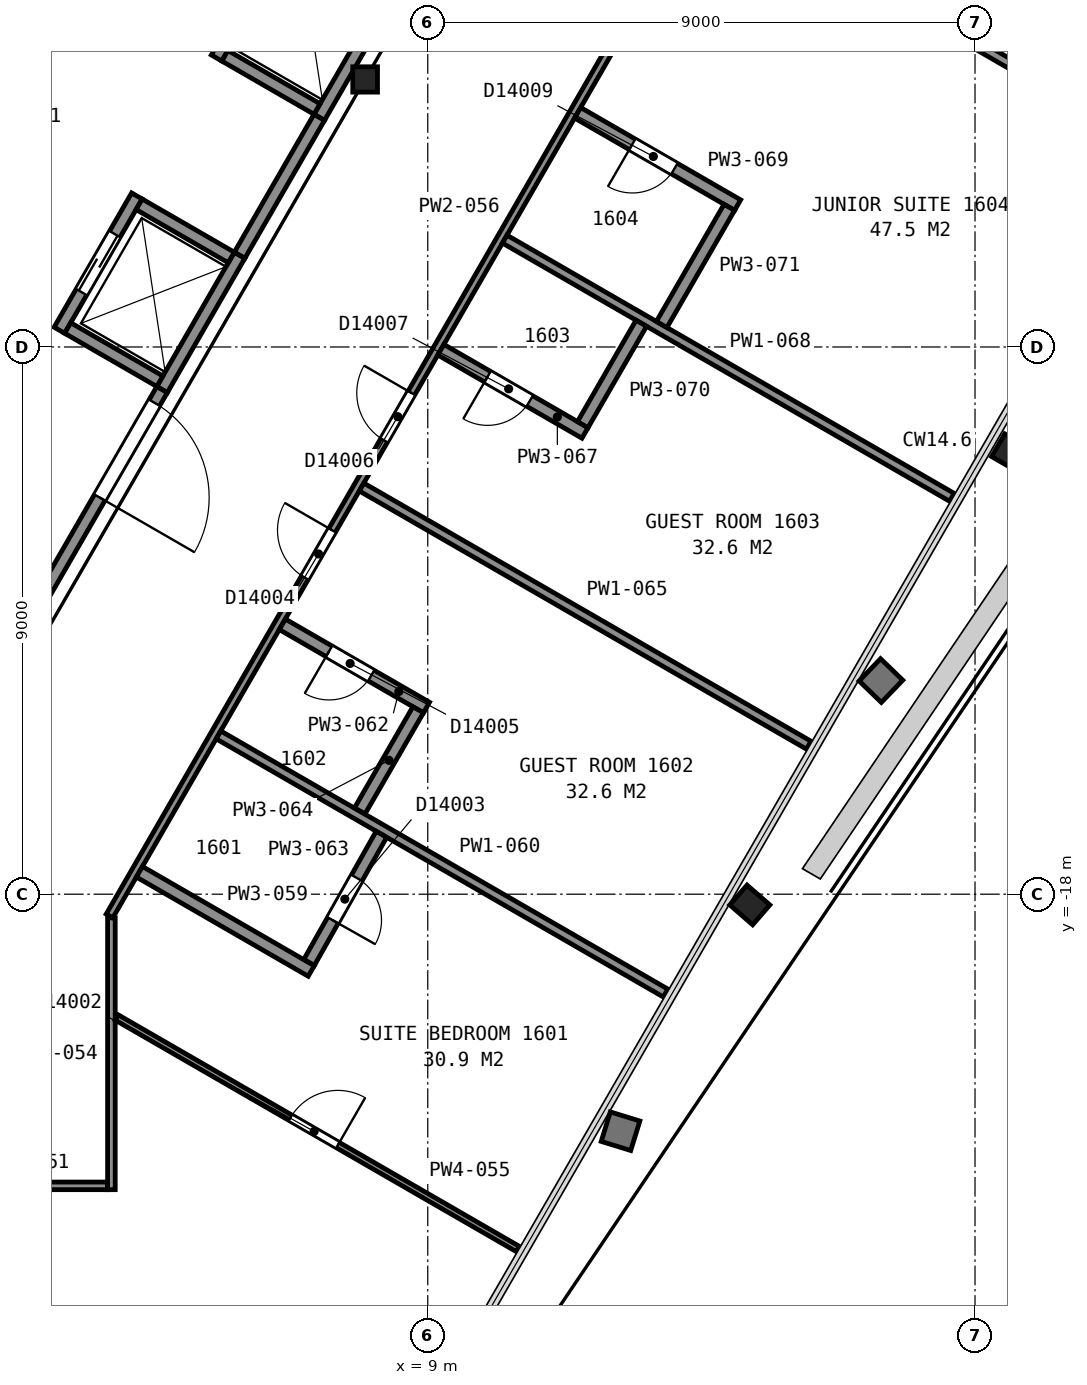
"""IFC4 building model, lengths in metres.
Left out: names, types, materials, properties, quantities, classifications, styles, units other than length and angle.
Written with IfcOpenShell. Run it as: python <this file> out.ifc"""

import sys

from ifc_helpers import new_model, si_unit, direction, frame, frame_2d, origin, origin_2d, place, context, subcontext, project, spatial, rectangle, i_section, extrude, element, fill, save


model = new_model("IFC4")
c1 = context("Model", 3, precision=1e-05, world=origin(), true_north=direction((0.0, 1.0)))
c2 = subcontext(c1, "Body", "Model", "MODEL_VIEW")
j1 = project(units=[si_unit("LENGTHUNIT", "METRE"), si_unit("PLANEANGLEUNIT", "RADIAN")], contexts=[c1])
p1 = place(None, origin())
s1 = spatial("IfcSite", under=j1, at=p1, CompositionType="ELEMENT")
p2 = place(p1, origin())
s2 = spatial("IfcBuilding", under=s1, at=p2, CompositionType="ELEMENT")
p3 = place(p2, frame((0.0, 0.0, 72.8)))
s3 = spatial("IfcBuildingStorey", under=s2, at=p3, CompositionType="ELEMENT", Elevation=72.8)
p4 = place(p3, frame((14.222, -18.111, 0.025), z_axis=(0.063660519168, -0.055368890729, 0.996434455566), x_axis=(-0.500027144747, -0.865858806591, -0.01616729924)))
e1 = element("IfcColumn", 1, at=p4, inside=s3, PredefinedType="COLUMN", context=c2, shape_type="SweptSolid", body=[
    extrude(i_section(OverallWidth=0.432, OverallDepth=0.498, WebThickness=0.056, FlangeThickness=0.089, FilletRadius=0.015, at=origin_2d()), origin(), (0.0, 0.0, 1.0), 3.563),
])
p5 = place(p3, frame((18.512, -10.691, 0.025), z_axis=(0.07202792121, -0.041599379805, 0.996534731038), x_axis=(-0.500403695, -0.865792204467, 2.6711735e-05)))
e2 = element("IfcColumn", 2, at=p5, inside=s3, PredefinedType="COLUMN", context=c2, shape_type="SweptSolid", body=[
    extrude(i_section(OverallWidth=0.432, OverallDepth=0.498, WebThickness=0.056, FlangeThickness=0.089, FilletRadius=0.015, at=origin_2d()), origin(), (0.0, 0.0, 1.0), 3.562),
])
p6 = place(p3, frame((7.97, -4.6, 0.0), z_axis=(0.0, 0.0, 1.0), x_axis=(1.0, 0.0, 0.0)))
e3 = element("IfcColumn", 3, at=p6, inside=s3, PredefinedType="COLUMN", context=c2, shape_type="SweptSolid", body=[
    extrude(i_section(OverallWidth=0.406, OverallDepth=0.417, WebThickness=0.03, FlangeThickness=0.048, FilletRadius=0.015, at=origin_2d()), origin(), (0.0, 0.0, 1.0), 3.6),
])
p7 = place(p3, frame((4.63, -9.7, 0.0), z_axis=(0.0, 0.0, 1.0), x_axis=(0.500062241894, 0.865989465428, 0.0)))
e4 = element("IfcWall", 4, at=p7, inside=s3, PredefinedType="PARTITIONING", context=c2, shape_type="SweptSolid", body=[
    extrude(rectangle(XDim=2.55, YDim=0.2, at=frame_2d((1.275, 0.0))), origin(), (0.0, 0.0, 1.0), 3.6),
])
p8 = place(p3, frame((7.216, -5.222, 0.0), z_axis=(0.0, 0.0, 1.0), x_axis=(0.499990435942, 0.866030925526, 0.0)))
e5 = element("IfcWall", 5, at=p8, inside=s3, PredefinedType="PARTITIONING", context=c2, shape_type="SweptSolid", body=[
    extrude(rectangle(XDim=2.55, YDim=0.2, at=frame_2d((1.275, 0.0))), origin(), (0.0, 0.0, 1.0), 3.6),
])
p9 = place(p3, frame((2.942, -8.725, 0.0), z_axis=(0.0, 0.0, 1.0), x_axis=(0.500020783669, 0.866013403995, 0.0)))
e6 = element("IfcWall", 6, at=p9, inside=s3, PredefinedType="PARTITIONING", context=c2, shape_type="SweptSolid", body=[
    extrude(rectangle(XDim=2.55, YDim=0.2, at=frame_2d((1.275, 0.0))), origin(), (0.0, 0.0, 1.0), 3.6),
])
p10 = place(p9, frame((0.725, 0.0, 0.0)))
e7 = element("IfcOpeningElement", 7, at=p10, cuts=e6, PredefinedType="OPENING", context=c2, shape_type="SweptSolid", body=[
    extrude(rectangle(XDim=1.1, YDim=2.1, at=frame_2d((0.55, 1.05))), frame((0.0, 0.11, 0.0), z_axis=(0.0, -1.0, 0.0), x_axis=(1.0, 0.0, 0.0)), (0.0, 0.0, 1.0), 0.22),
])
p11 = place(p3, frame((5.527, -4.247, 0.0), z_axis=(0.0, 0.0, 1.0), x_axis=(0.499938297808, 0.866061024631, 0.0)))
e8 = element("IfcWall", 8, at=p11, inside=s3, PredefinedType="PARTITIONING", context=c2, shape_type="SweptSolid", body=[
    extrude(rectangle(XDim=2.35, YDim=0.2, at=frame_2d((1.175, 0.0))), origin(), (0.0, 0.0, 1.0), 3.6),
])
p12 = place(p11, frame((0.725, 0.0, 0.0)))
e9 = element("IfcOpeningElement", 9, at=p12, cuts=e8, PredefinedType="OPENING", context=c2, shape_type="SweptSolid", body=[
    extrude(rectangle(XDim=1.1, YDim=2.1, at=frame_2d((0.55, 1.05))), frame((0.0, 0.11, 0.0), z_axis=(0.0, -1.0, 0.0), x_axis=(1.0, 0.0, 0.0)), (0.0, 0.0, 1.0), 0.22),
])
p13 = place(p3, frame((7.179, -5.086, 0.0), z_axis=(0.0, 0.0, 1.0), x_axis=(-0.866036909293, 0.499980071345, 0.0)))
e10 = element("IfcWall", 10, at=p13, inside=s3, PredefinedType="PARTITIONING", context=c2, shape_type="SweptSolid", body=[
    extrude(rectangle(XDim=1.75, YDim=0.2, at=frame_2d((0.875, 0.0))), origin(), (0.0, 0.0, 1.0), 3.6),
])
p14 = place(p3, frame((5.769, -7.528, 0.0), z_axis=(0.0, 0.0, 1.0), x_axis=(-0.866002029911, 0.500040482552, 0.0)))
e11 = element("IfcWall", 11, at=p14, inside=s3, PredefinedType="PARTITIONING", context=c2, shape_type="SweptSolid", body=[
    extrude(rectangle(XDim=1.75, YDim=0.2, at=frame_2d((0.875, 0.0))), origin(), (0.0, 0.0, 1.0), 3.6),
])
p15 = place(p3, frame((4.594, -9.563, 0.0), z_axis=(0.0, 0.0, 1.0), x_axis=(-0.866036909293, 0.499980071345, 0.0)))
e12 = element("IfcWall", 12, at=p15, inside=s3, PredefinedType="PARTITIONING", context=c2, shape_type="SweptSolid", body=[
    extrude(rectangle(XDim=1.75, YDim=0.2, at=frame_2d((0.875, 0.0))), origin(), (0.0, 0.0, 1.0), 3.6),
])
p16 = place(p3, frame((1.677, -14.815, 0.0), z_axis=(0.0, 0.0, 1.0), x_axis=(0.49999445743, 0.866028603765, 0.0)))
e13 = element("IfcWall", 13, at=p16, inside=s3, PredefinedType="PARTITIONING", context=c2, shape_type="SweptSolid", body=[
    extrude(rectangle(XDim=5.905, YDim=0.2, at=frame_2d((2.952, 0.0))), origin(), (0.0, 0.0, 1.0), 3.35),
])
p17 = place(p16, frame((3.855, 0.0, 0.0)))
e14 = element("IfcOpeningElement", 14, at=p17, cuts=e13, PredefinedType="OPENING", context=c2, shape_type="SweptSolid", body=[
    extrude(rectangle(XDim=1.8, YDim=2.1, at=frame_2d((0.9, 1.05))), frame((0.0, 0.11, 0.0), z_axis=(0.0, -1.0, 0.0), x_axis=(1.0, 0.0, 0.0)), (0.0, 0.0, 1.0), 0.22),
])
p18 = place(p3, frame((5.906, -7.49, 0.0), z_axis=(0.0, 0.0, 1.0), x_axis=(0.500252727967, 0.865879442048, 0.0)))
e15 = element("IfcWall", 15, at=p18, inside=s3, PredefinedType="PARTITIONING", context=c2, shape_type="SweptSolid", body=[
    extrude(rectangle(XDim=2.617, YDim=0.2, at=frame_2d((1.309, 0.0))), origin(), (0.0, 0.0, 1.0), 3.35),
])
p19 = place(p3, frame((1.14, -22.797, 0.0), z_axis=(0.0, 0.0, 1.0), x_axis=(1.0, 0.0, 0.0)))
e16 = element("IfcWall", 16, at=p19, inside=s3, PredefinedType="PARTITIONING", context=c2, shape_type="SweptSolid", body=[
    extrude(rectangle(XDim=2.592, YDim=0.125, at=frame_2d((1.296, 0.0))), origin(), (0.0, 0.0, 1.0), 2.613),
])
p20 = place(p3, frame((3.797, -22.86, 0.0), z_axis=(0.0, 0.0, 1.0), x_axis=(0.0, 1.0, 0.0)))
e17 = element("IfcWall", 17, at=p20, inside=s3, PredefinedType="PARTITIONING", context=c2, shape_type="SweptSolid", body=[
    extrude(rectangle(XDim=4.471, YDim=0.125, at=frame_2d((2.235, 0.0))), origin(), (0.0, 0.0, 1.0), 2.613),
])
p21 = place(p3, frame((3.885, -20.028, 0.0), z_axis=(0.0, 0.0, 1.0), x_axis=(0.866080975745, -0.499903734186, 0.0)))
e18 = element("IfcWall", 18, at=p21, inside=s3, PredefinedType="PARTITIONING", context=c2, shape_type="SweptSolid", body=[
    extrude(rectangle(XDim=7.617, YDim=0.1, at=frame_2d((3.808, 0.0))), origin(), (0.0, 0.0, 1.0), 2.613),
])
p22 = place(p21, frame((3.299, 0.0, 0.0)))
e19 = element("IfcOpeningElement", 19, at=p22, cuts=e18, PredefinedType="OPENING", context=c2, shape_type="SweptSolid", body=[
    extrude(rectangle(XDim=0.9, YDim=2.1, at=frame_2d((0.45, 1.05))), frame((0.0, 0.06, 0.0), z_axis=(0.0, -1.0, 0.0), x_axis=(1.0, 0.0, 0.0)), (0.0, 0.0, 1.0), 0.12),
])
p23 = place(p3, frame((18.179, 6.606, 0.0), z_axis=(0.0, 0.0, 1.0), x_axis=(-0.500003973642, -0.866023109589, 0.0)))
e20 = element("IfcWall", 20, at=p23, inside=s3, PredefinedType="PARTITIONING", context=c2, shape_type="SweptSolid", body=[
    extrude(rectangle(XDim=28.826, YDim=0.125, at=frame_2d((14.413, 0.0))), origin(), (0.0, 0.0, 1.0), 2.613),
])
p24 = place(p23, frame((21.501, 0.0, 0.0)))
e21 = element("IfcOpeningElement", 21, at=p24, cuts=e20, PredefinedType="OPENING", context=c2, shape_type="SweptSolid", body=[
    extrude(rectangle(XDim=0.9, YDim=2.1, at=frame_2d((0.45, 1.05))), frame((0.0, 0.073, 0.0), z_axis=(0.0, -1.0, 0.0), x_axis=(1.0, 0.0, 0.0)), (0.0, 0.0, 1.0), 0.145),
])
p25 = place(p23, frame((18.894, 0.0, 0.0)))
e22 = element("IfcOpeningElement", 22, at=p25, cuts=e20, PredefinedType="OPENING", context=c2, shape_type="SweptSolid", body=[
    extrude(rectangle(XDim=0.9, YDim=2.1, at=frame_2d((0.45, 1.05))), frame((0.0, 0.073, 0.0), z_axis=(0.0, -1.0, 0.0), x_axis=(1.0, 0.0, 0.0)), (0.0, 0.0, 1.0), 0.145),
])
p26 = place(p23, frame((10.937, 0.0, 0.0)))
e23 = element("IfcOpeningElement", 23, at=p26, cuts=e20, PredefinedType="OPENING", context=c2, shape_type="SweptSolid", body=[
    extrude(rectangle(XDim=0.9, YDim=2.1, at=frame_2d((0.45, 1.05))), frame((0.0, 0.073, 0.0), z_axis=(0.0, -1.0, 0.0), x_axis=(1.0, 0.0, 0.0)), (0.0, 0.0, 1.0), 0.145),
])
p27 = place(p23, frame((7.535, 0.0, 0.0)))
e24 = element("IfcOpeningElement", 24, at=p27, cuts=e20, PredefinedType="OPENING", context=c2, shape_type="SweptSolid", body=[
    extrude(rectangle(XDim=0.9, YDim=2.1, at=frame_2d((0.45, 1.05))), frame((0.0, 0.073, 0.0), z_axis=(0.0, -1.0, 0.0), x_axis=(1.0, 0.0, 0.0)), (0.0, 0.0, 1.0), 0.145),
])
p28 = place(p23, frame((0.827, 0.0, 0.0)))
e25 = element("IfcOpeningElement", 25, at=p28, cuts=e20, PredefinedType="OPENING", context=c2, shape_type="SweptSolid", body=[
    extrude(rectangle(XDim=0.9, YDim=2.1, at=frame_2d((0.45, 1.05))), frame((0.0, 0.073, 0.0), z_axis=(0.0, -1.0, 0.0), x_axis=(1.0, 0.0, 0.0)), (0.0, 0.0, 1.0), 0.145),
])
p29 = place(p3, frame((4.258, -17.631, 0.0), z_axis=(0.0, 0.0, 1.0), x_axis=(0.865982457891, -0.500074377092, 0.0)))
e26 = element("IfcWall", 26, at=p29, inside=s3, PredefinedType="PARTITIONING", context=c2, shape_type="SweptSolid", body=[
    extrude(rectangle(XDim=3.263, YDim=0.2, at=frame_2d((1.631, 0.0))), origin(), (0.0, 0.0, 1.0), 2.613),
])
p30 = place(p3, frame((5.558, -15.38, 0.0), z_axis=(0.0, 0.0, 1.0), x_axis=(0.866022790583, -0.50000452617, 0.0)))
e27 = element("IfcWall", 27, at=p30, inside=s3, PredefinedType="PARTITIONING", context=c2, shape_type="SweptSolid", body=[
    extrude(rectangle(XDim=8.491, YDim=0.15, at=frame_2d((4.246, 0.0))), origin(), (0.0, 0.0, 1.0), 2.613),
])
p31 = place(p3, frame((8.979, -14.93, 0.0), z_axis=(0.0, 0.0, 1.0), x_axis=(-0.866005850709, 0.50003386539, 0.0)))
e28 = element("IfcWall", 28, at=p31, inside=s3, PredefinedType="PARTITIONING", context=c2, shape_type="SweptSolid", body=[
    extrude(rectangle(XDim=2.737, YDim=0.2, at=frame_2d((1.369, 0.0))), origin(), (0.0, 0.0, 1.0), 2.613),
])
p32 = place(p31, frame((1.05, 0.0, 0.0)))
e29 = element("IfcOpeningElement", 29, at=p32, cuts=e28, PredefinedType="OPENING", context=c2, shape_type="SweptSolid", body=[
    extrude(rectangle(XDim=0.8, YDim=2.1, at=frame_2d((0.4, 1.05))), frame((0.0, 0.11, 0.0), z_axis=(0.0, -1.0, 0.0), x_axis=(1.0, 0.0, 0.0)), (0.0, 0.0, 1.0), 0.22),
])
p33 = place(p3, frame((7.049, -19.122, 0.0), z_axis=(0.0, 0.0, 1.0), x_axis=(0.491544985814, 0.870852184312, 0.0)))
e30 = element("IfcWall", 30, at=p33, inside=s3, PredefinedType="PARTITIONING", context=c2, shape_type="SweptSolid", body=[
    extrude(rectangle(XDim=2.419, YDim=0.2, at=frame_2d((1.209, 0.0))), origin(), (0.0, 0.0, 1.0), 2.613),
])
p34 = place(p33, frame((0.795, 0.0, 0.0)))
e31 = element("IfcOpeningElement", 31, at=p34, cuts=e30, PredefinedType="OPENING", context=c2, shape_type="SweptSolid", body=[
    extrude(rectangle(XDim=0.8, YDim=2.1, at=frame_2d((0.4, 1.05))), frame((0.0, 0.11, 0.0), z_axis=(0.0, -1.0, 0.0), x_axis=(1.0, 0.0, 0.0)), (0.0, 0.0, 1.0), 0.22),
])
p35 = place(p3, frame((7.882, -16.63, 0.0), z_axis=(0.0, 0.0, 1.0), x_axis=(0.499913221443, 0.866075499611, 0.0)))
e32 = element("IfcWall", 32, at=p35, inside=s3, PredefinedType="PARTITIONING", context=c2, shape_type="SweptSolid", body=[
    extrude(rectangle(XDim=1.92, YDim=0.2, at=frame_2d((0.96, 0.0))), origin(), (0.0, 0.0, 1.0), 2.613),
])
p36 = place(p3, frame((7.911, -11.303, 0.0), z_axis=(0.0, 0.0, 1.0), x_axis=(0.866012267213, -0.500022752519, 0.0)))
e33 = element("IfcWall", 33, at=p36, inside=s3, PredefinedType="PARTITIONING", context=c2, shape_type="SweptSolid", body=[
    extrude(rectangle(XDim=8.492, YDim=0.15, at=frame_2d((4.246, 0.0))), origin(), (0.0, 0.0, 1.0), 2.613),
])
p37 = place(p3, frame((9.215, -9.045, 0.0), z_axis=(0.0, 0.0, 1.0), x_axis=(0.865989529477, -0.500062130976, 0.0)))
e34 = element("IfcWall", 34, at=p37, inside=s3, PredefinedType="PARTITIONING", context=c2, shape_type="SweptSolid", body=[
    extrude(rectangle(XDim=2.738, YDim=0.2, at=frame_2d((1.369, 0.0))), origin(), (0.0, 0.0, 1.0), 2.613),
])
p38 = place(p37, frame((0.887, 0.0, 0.0)))
e35 = element("IfcOpeningElement", 35, at=p38, cuts=e34, PredefinedType="OPENING", context=c2, shape_type="SweptSolid", body=[
    extrude(rectangle(XDim=0.8, YDim=2.1, at=frame_2d((0.4, 1.05))), frame((0.0, 0.11, 0.0), z_axis=(0.0, -1.0, 0.0), x_axis=(1.0, 0.0, 0.0)), (0.0, 0.0, 1.0), 0.22),
])
p39 = place(p3, frame((10.265, -7.226, 0.0), z_axis=(0.0, 0.0, 1.0), x_axis=(0.866024716685, -0.500001190089, 0.0)))
e36 = element("IfcWall", 36, at=p39, inside=s3, PredefinedType="PARTITIONING", context=c2, shape_type="SweptSolid", body=[
    extrude(rectangle(XDim=8.492, YDim=0.15, at=frame_2d((4.246, 0.0))), origin(), (0.0, 0.0, 1.0), 2.613),
])
p40 = place(p3, frame((14.096, -6.667, 0.0), z_axis=(0.0, 0.0, 1.0), x_axis=(-0.866023634079, 0.500003065207, 0.0)))
e37 = element("IfcWall", 37, at=p40, inside=s3, PredefinedType="PARTITIONING", context=c2, shape_type="SweptSolid", body=[
    extrude(rectangle(XDim=3.038, YDim=0.2, at=frame_2d((1.519, 0.0))), origin(), (0.0, 0.0, 1.0), 2.613),
])
p41 = place(p40, frame((1.2, 0.0, 0.0)))
e38 = element("IfcOpeningElement", 38, at=p41, cuts=e37, PredefinedType="OPENING", context=c2, shape_type="SweptSolid", body=[
    extrude(rectangle(XDim=0.8, YDim=2.1, at=frame_2d((0.4, 1.05))), frame((0.0, 0.11, 0.0), z_axis=(0.0, -1.0, 0.0), x_axis=(1.0, 0.0, 0.0)), (0.0, 0.0, 1.0), 0.22),
])
p42 = place(p3, frame((11.549, -10.277, 0.0), z_axis=(0.0, 0.0, 1.0), x_axis=(0.499876134923, 0.86609690551, 0.0)))
e39 = element("IfcWall", 39, at=p42, inside=s3, PredefinedType="PARTITIONING", context=c2, shape_type="SweptSolid", body=[
    extrude(rectangle(XDim=1.925, YDim=0.2, at=frame_2d((0.963, 0.0))), origin(), (0.0, 0.0, 1.0), 2.613),
])
p43 = place(p3, frame((12.846, -8.63, 0.0), z_axis=(0.0, 0.0, 1.0), x_axis=(0.500092923031, 0.865971748, 0.0)))
e40 = element("IfcWall", 40, at=p43, inside=s3, PredefinedType="PARTITIONING", context=c2, shape_type="SweptSolid", body=[
    extrude(rectangle(XDim=2.225, YDim=0.2, at=frame_2d((1.112, 0.0))), origin(), (0.0, 0.0, 1.0), 2.613),
])
p44 = place(p3, frame((13.591, -1.466, 0.0), z_axis=(0.0, 0.0, 1.0), x_axis=(0.866022790583, -0.50000452617, 0.0)))
e41 = element("IfcWall", 41, at=p44, inside=s3, PredefinedType="PARTITIONING", context=c2, shape_type="SweptSolid", body=[
    extrude(rectangle(XDim=8.491, YDim=0.15, at=frame_2d((4.246, 0.0))), origin(), (0.0, 0.0, 1.0), 2.613),
])
p45 = place(p10, origin())
e42 = element("IfcDoor", 42, at=p45, inside=s3, OperationType="SLIDING_TO_RIGHT", PredefinedType="DOOR", context=c2, shape_type="SweptSolid", body=[
    extrude(rectangle(XDim=1.1, YDim=2.1, at=frame_2d((0.55, 1.05))), frame((0.0, 0.025, 0.0), z_axis=(0.0, -1.0, 0.0), x_axis=(1.0, 0.0, 0.0)), (0.0, 0.0, 1.0), 0.05),
])
fill(e7, e42)
p46 = place(p17, origin())
e43 = element("IfcDoor", 43, at=p46, inside=s3, OperationType="DOUBLE_DOOR_SINGLE_SWING", PredefinedType="DOOR", context=c2, shape_type="SweptSolid", body=[
    extrude(rectangle(XDim=1.8, YDim=2.1, at=frame_2d((0.9, 1.05))), frame((0.0, 0.025, 0.0), z_axis=(0.0, -1.0, 0.0), x_axis=(1.0, 0.0, 0.0)), (0.0, 0.0, 1.0), 0.05),
])
fill(e14, e43)
p47 = place(p22, origin())
e44 = element("IfcDoor", 44, at=p47, inside=s3, OperationType="SINGLE_SWING_RIGHT", PredefinedType="DOOR", context=c2, shape_type="SweptSolid", body=[
    extrude(rectangle(XDim=0.9, YDim=2.1, at=frame_2d((0.45, 1.05))), frame((0.0, 0.025, 0.0), z_axis=(0.0, -1.0, 0.0), x_axis=(1.0, 0.0, 0.0)), (0.0, 0.0, 1.0), 0.05),
])
fill(e19, e44)
p48 = place(p24, origin())
e45 = element("IfcDoor", 45, at=p48, inside=s3, OperationType="SINGLE_SWING_LEFT", PredefinedType="DOOR", context=c2, shape_type="SweptSolid", body=[
    extrude(rectangle(XDim=0.9, YDim=2.1, at=frame_2d((0.45, 1.05))), frame((0.0, 0.025, 0.0), z_axis=(0.0, -1.0, 0.0), x_axis=(1.0, 0.0, 0.0)), (0.0, 0.0, 1.0), 0.05),
])
fill(e21, e45)
p49 = place(p25, origin())
e46 = element("IfcDoor", 46, at=p49, inside=s3, OperationType="SINGLE_SWING_LEFT", PredefinedType="DOOR", context=c2, shape_type="SweptSolid", body=[
    extrude(rectangle(XDim=0.9, YDim=2.1, at=frame_2d((0.45, 1.05))), frame((0.0, 0.025, 0.0), z_axis=(0.0, -1.0, 0.0), x_axis=(1.0, 0.0, 0.0)), (0.0, 0.0, 1.0), 0.05),
])
fill(e22, e46)
p50 = place(p32, origin())
e47 = element("IfcDoor", 47, at=p50, inside=s3, OperationType="SINGLE_SWING_RIGHT", PredefinedType="DOOR", context=c2, shape_type="SweptSolid", body=[
    extrude(rectangle(XDim=0.8, YDim=2.1, at=frame_2d((0.4, 1.05))), frame((0.0, 0.025, 0.0), z_axis=(0.0, -1.0, 0.0), x_axis=(1.0, 0.0, 0.0)), (0.0, 0.0, 1.0), 0.05),
])
fill(e29, e47)
p51 = place(p34, origin())
e48 = element("IfcDoor", 48, at=p51, inside=s3, OperationType="SINGLE_SWING_LEFT", PredefinedType="DOOR", context=c2, shape_type="SweptSolid", body=[
    extrude(rectangle(XDim=0.8, YDim=2.1, at=frame_2d((0.4, 1.05))), frame((0.0, 0.025, 0.0), z_axis=(0.0, -1.0, 0.0), x_axis=(1.0, 0.0, 0.0)), (0.0, 0.0, 1.0), 0.05),
])
fill(e31, e48)
p52 = place(p38, origin())
e49 = element("IfcDoor", 49, at=p52, inside=s3, OperationType="SINGLE_SWING_LEFT", PredefinedType="DOOR", context=c2, shape_type="SweptSolid", body=[
    extrude(rectangle(XDim=0.8, YDim=2.1, at=frame_2d((0.4, 1.05))), frame((0.0, 0.025, 0.0), z_axis=(0.0, -1.0, 0.0), x_axis=(1.0, 0.0, 0.0)), (0.0, 0.0, 1.0), 0.05),
])
fill(e35, e49)
p53 = place(p41, origin())
e50 = element("IfcDoor", 50, at=p53, inside=s3, OperationType="SINGLE_SWING_RIGHT", PredefinedType="DOOR", context=c2, shape_type="SweptSolid", body=[
    extrude(rectangle(XDim=0.8, YDim=2.1, at=frame_2d((0.4, 1.05))), frame((0.0, 0.025, 0.0), z_axis=(0.0, -1.0, 0.0), x_axis=(1.0, 0.0, 0.0)), (0.0, 0.0, 1.0), 0.05),
])
fill(e38, e50)
save(model, sys.argv[1])
